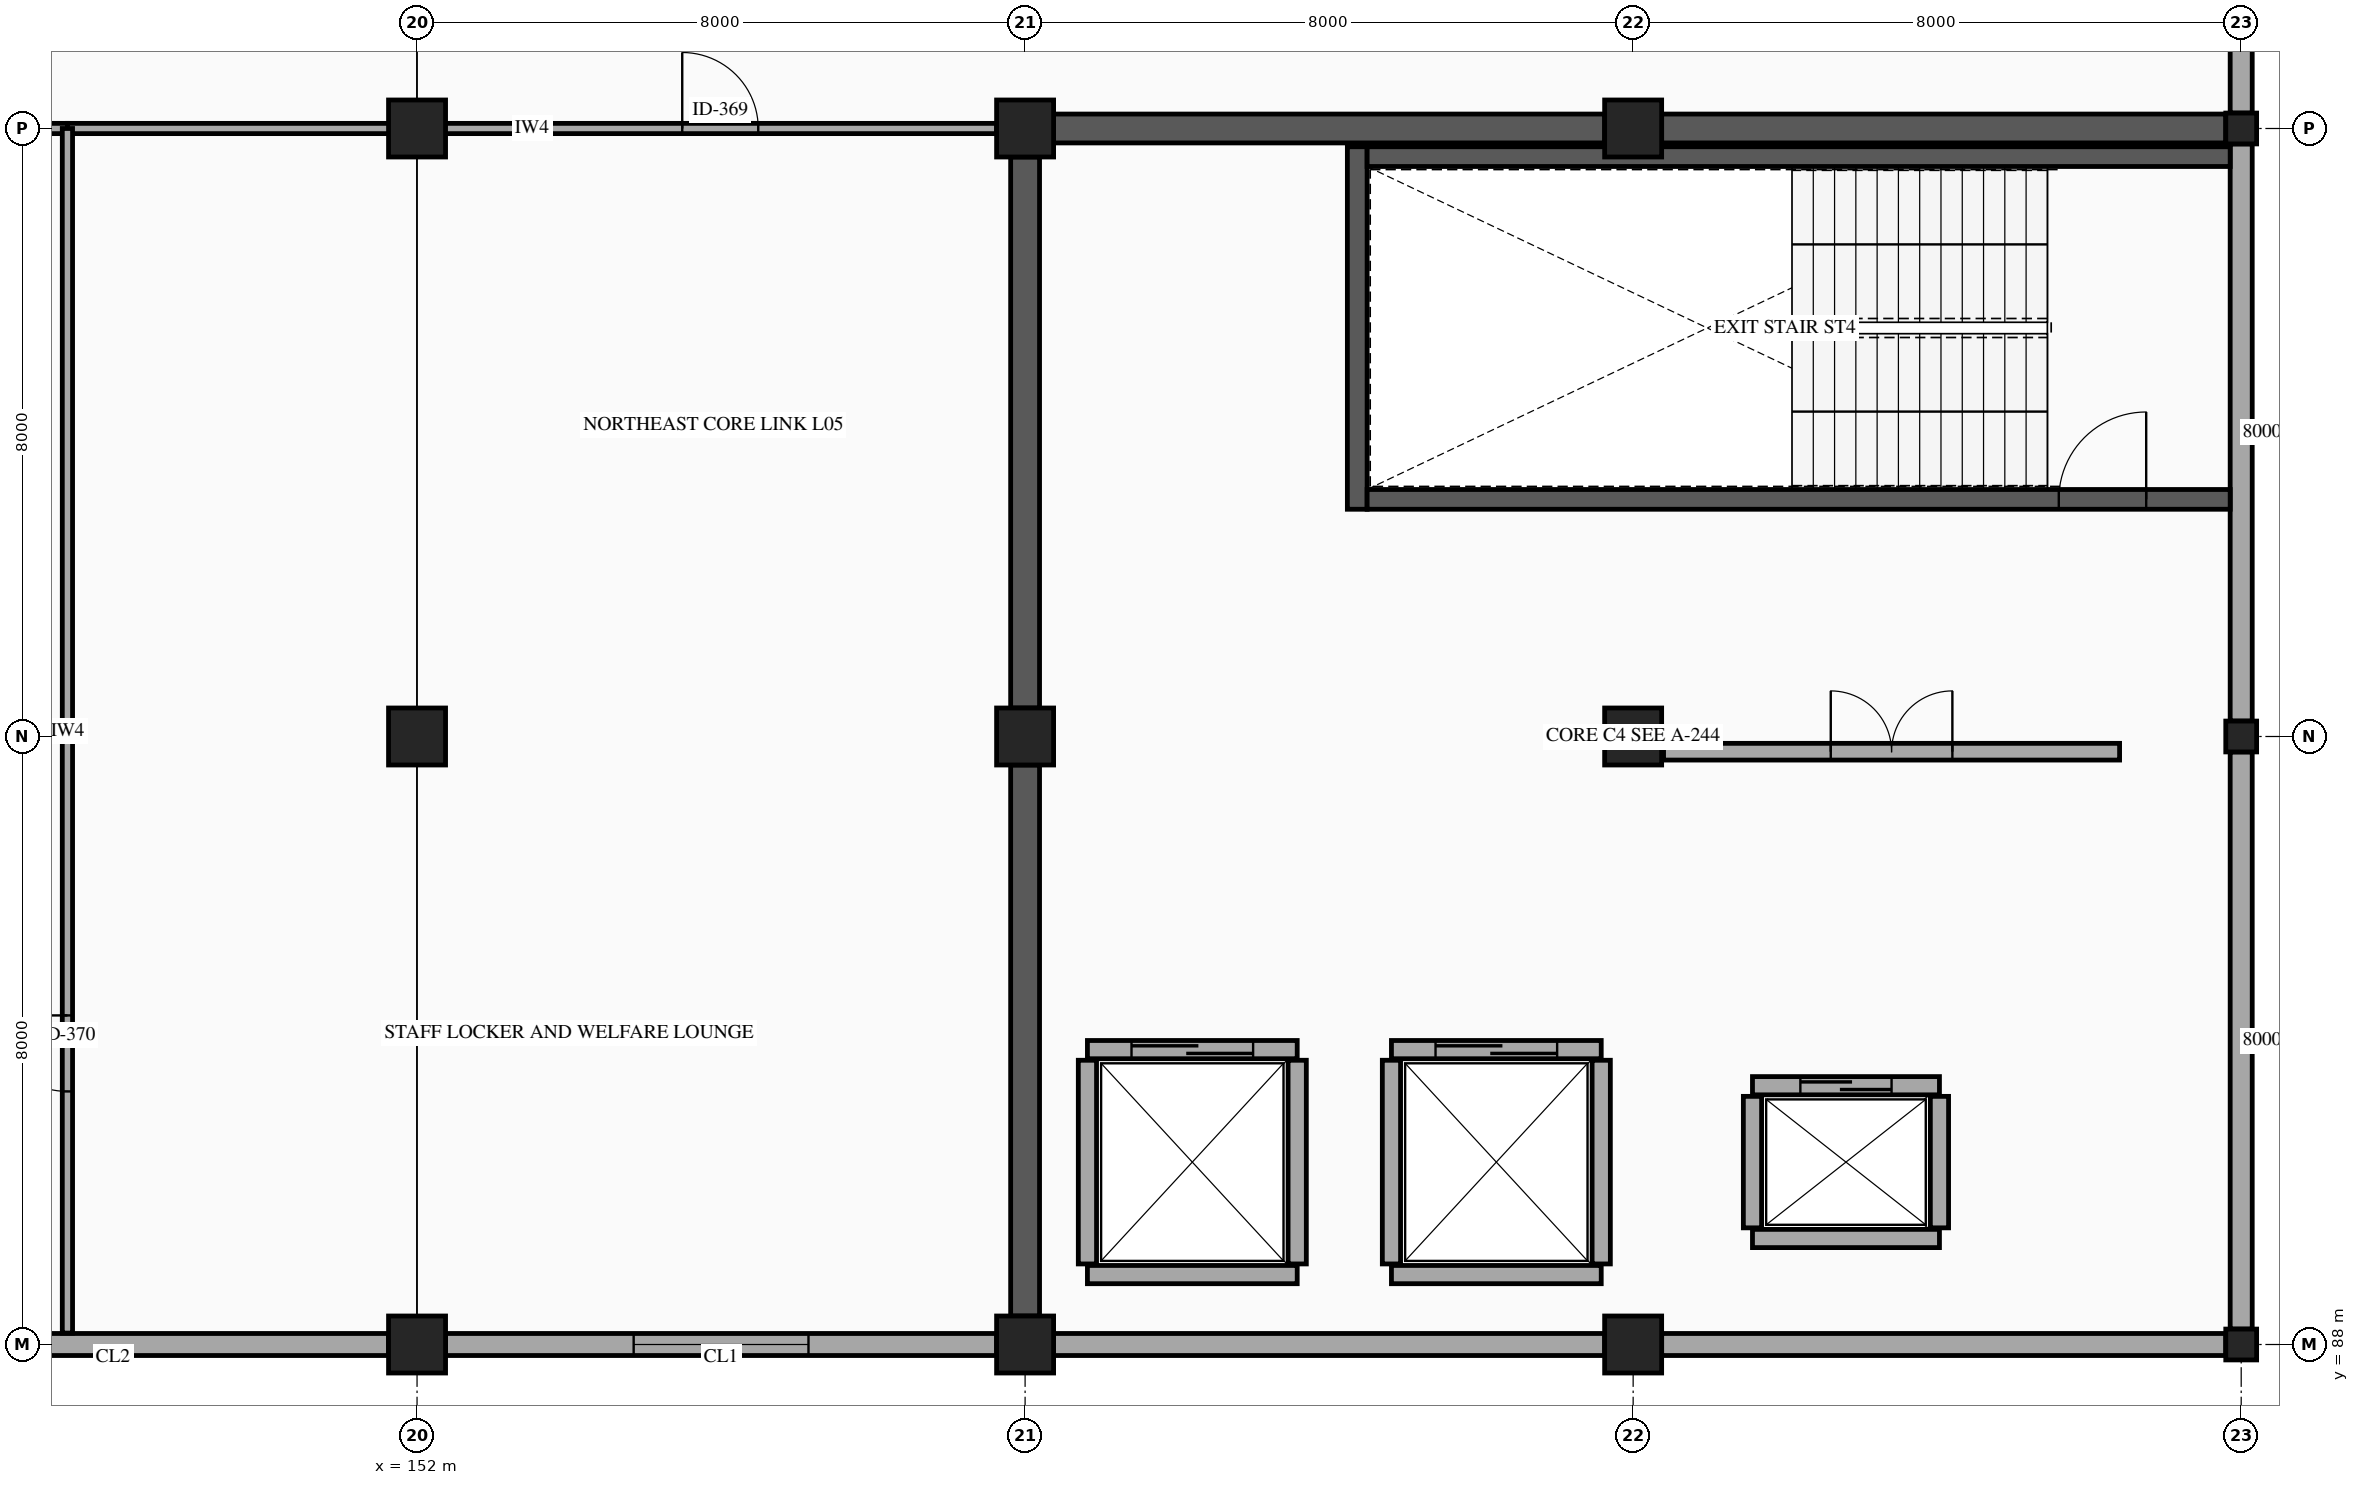
"""IFC4 building model, lengths in metres.
Left out: names, types, materials, properties, quantities, classifications, styles, units other than length and angle.
Written with IfcOpenShell. Run it as: python <this file> out.ifc"""

import sys

from ifc_helpers import new_model, si_unit, direction, frame, frame_2d, origin, origin_2d, place, context, subcontext, project, spatial, rectangle, hollow_rectangle, extrude, element, fill, save


model = new_model("IFC4")
c1 = context("Model", 3, precision=1e-05, world=origin(), true_north=direction((0.0, 1.0)))
c2 = subcontext(c1, "Body", "Model", "MODEL_VIEW")
j1 = project(units=[si_unit("LENGTHUNIT", "METRE"), si_unit("PLANEANGLEUNIT", "RADIAN")], contexts=[c1])
p1 = place(None, origin())
s1 = spatial("IfcSite", under=j1, at=p1, CompositionType="ELEMENT")
p2 = place(p1, origin())
s2 = spatial("IfcBuilding", under=s1, at=p2, CompositionType="ELEMENT")
p3 = place(p2, frame((0.0, 0.0, 23.9)))
s3 = spatial("IfcBuildingStorey", under=s2, at=p3, CompositionType="ELEMENT", Elevation=23.9)
for number, where, z_axis, x_axis in (
    (1, (152.0, 88.0, 0.0), (0.0, 0.0, 1.0), (1.0, 0.0, 0.0)),
    (2, (152.0, 96.0, 0.0), (0.0, 0.0, 1.0), (1.0, 0.0, 0.0)),
    (3, (152.0, 104.0, 0.0), (0.0, 0.0, 1.0), (1.0, 0.0, 0.0)),
    (4, (160.0, 88.0, 0.0), (0.0, 0.0, 1.0), (1.0, 0.0, 0.0)),
    (5, (160.0, 96.0, 0.0), (0.0, 0.0, 1.0), (1.0, 0.0, 0.0)),
    (6, (160.0, 104.0, 0.0), (0.0, 0.0, 1.0), (1.0, 0.0, 0.0)),
    (7, (168.0, 88.0, 0.0), (0.0, 0.0, 1.0), (1.0, 0.0, 0.0)),
    (8, (168.0, 96.0, 0.0), (0.0, 0.0, 1.0), (1.0, 0.0, 0.0)),
    (9, (168.0, 104.0, 0.0), (0.0, 0.0, 1.0), (1.0, 0.0, 0.0)),
):
    element("IfcColumn", number, at=place(p3, frame(where, z_axis=z_axis, x_axis=x_axis)), inside=s3, PredefinedType="COLUMN", context=c2, shape_type="SweptSolid", body=[
        extrude(rectangle(XDim=0.75, YDim=0.75, at=origin_2d()), origin(), (0.0, 0.0, 1.0), 4.5),
    ])
for number, where, z_axis, x_axis in (
    (10, (176.0, 88.0, 0.0), (0.0, 0.0, 1.0), (1.0, 0.0, 0.0)),
    (11, (176.0, 96.0, 0.0), (0.0, 0.0, 1.0), (1.0, 0.0, 0.0)),
    (12, (176.0, 104.0, 0.0), (0.0, 0.0, 1.0), (1.0, 0.0, 0.0)),
):
    element("IfcColumn", number, at=place(p3, frame(where, z_axis=z_axis, x_axis=x_axis)), inside=s3, PredefinedType="COLUMN", context=c2, shape_type="SweptSolid", body=[
        extrude(hollow_rectangle(XDim=0.406, YDim=0.406, WallThickness=0.015, InnerFilletRadius=0.015, OuterFilletRadius=0.029, at=origin_2d()), origin(), (0.0, 0.0, 1.0), 4.5),
    ])
for number, where, z_axis, x_axis in (
    (13, (176.0, 111.797, 0.0), (0.0, 0.0, 1.0), (0.0, -1.0, 0.0)),
    (14, (176.0, 103.797, 0.0), (0.0, 0.0, 1.0), (0.0, -1.0, 0.0)),
    (15, (176.0, 95.797, 0.0), (0.0, 0.0, 1.0), (0.0, -1.0, 0.0)),
):
    element("IfcWall", number, at=place(p3, frame(where, z_axis=z_axis, x_axis=x_axis)), inside=s3, PredefinedType="STANDARD", context=c2, shape_type="SweptSolid", body=[
        extrude(rectangle(XDim=7.594, YDim=0.29, at=frame_2d((3.797, 0.0))), origin(), (0.0, 0.0, 1.0), 3.48),
    ])
p4 = place(p3, frame((175.797, 88.0, 0.0), z_axis=(0.0, 0.0, 1.0), x_axis=(-1.0, 0.0, 0.0)))
e16 = element("IfcWall", 16, at=p4, inside=s3, PredefinedType="STANDARD", context=c2, shape_type="SweptSolid", body=[
    extrude(rectangle(XDim=7.422, YDim=0.29, at=frame_2d((3.711, 0.0))), origin(), (0.0, 0.0, 1.0), 3.48),
])
p5 = place(p3, frame((167.625, 88.0, 0.0), z_axis=(0.0, 0.0, 1.0), x_axis=(-1.0, 0.0, 0.0)))
e17 = element("IfcWall", 17, at=p5, inside=s3, PredefinedType="STANDARD", context=c2, shape_type="SweptSolid", body=[
    extrude(rectangle(XDim=7.25, YDim=0.29, at=frame_2d((3.625, 0.0))), origin(), (0.0, 0.0, 1.0), 3.48),
])
p6 = place(p3, frame((159.625, 88.0, 0.0), z_axis=(0.0, 0.0, 1.0), x_axis=(-1.0, 0.0, 0.0)))
e18 = element("IfcWall", 18, at=p6, inside=s3, PredefinedType="STANDARD", context=c2, shape_type="SweptSolid", body=[
    extrude(rectangle(XDim=7.25, YDim=0.29, at=frame_2d((3.625, 0.0))), origin(), (0.0, 0.0, 1.0), 3.48),
])
p7 = place(p6, frame((2.475, 0.0, 0.8)))
e19 = element("IfcOpeningElement", 19, at=p7, cuts=e18, PredefinedType="OPENING", context=c2, shape_type="SweptSolid", body=[
    extrude(rectangle(XDim=2.3, YDim=1.75, at=frame_2d((1.15, 0.875))), frame((0.0, 0.155, 0.0), z_axis=(0.0, -1.0, 0.0), x_axis=(1.0, 0.0, 0.0)), (0.0, 0.0, 1.0), 0.31),
])
p8 = place(p3, frame((151.625, 88.0, 0.0), z_axis=(0.0, 0.0, 1.0), x_axis=(-1.0, 0.0, 0.0)))
e20 = element("IfcWall", 20, at=p8, inside=s3, PredefinedType="STANDARD", context=c2, shape_type="SweptSolid", body=[
    extrude(rectangle(XDim=7.422, YDim=0.29, at=frame_2d((3.711, 0.0))), origin(), (0.0, 0.0, 1.0), 3.48),
])
p9 = place(p3, frame((164.37, 98.99, 0.0), z_axis=(0.0, 0.0, 1.0), x_axis=(0.0, 1.0, 0.0)))
e21 = element("IfcWall", 21, at=p9, inside=s3, PredefinedType="SHEAR", context=c2, shape_type="SweptSolid", body=[
    extrude(rectangle(XDim=4.77, YDim=0.26, at=frame_2d((2.385, 0.0))), origin(), (0.0, 0.0, 1.0), 4.28),
])
p10 = place(p3, frame((164.5, 99.12, 0.0), z_axis=(0.0, 0.0, 1.0), x_axis=(1.0, 0.0, 0.0)))
e22 = element("IfcWall", 22, at=p10, inside=s3, PredefinedType="SHEAR", context=c2, shape_type="SweptSolid", body=[
    extrude(rectangle(XDim=11.355, YDim=0.26, at=frame_2d((5.677, 0.0))), origin(), (0.0, 0.0, 1.0), 4.28),
])
p11 = place(p10, frame((9.1, 0.0, 0.0)))
e23 = element("IfcOpeningElement", 23, at=p11, cuts=e22, PredefinedType="OPENING", context=c2, shape_type="SweptSolid", body=[
    extrude(rectangle(XDim=1.15, YDim=2.15, at=frame_2d((0.575, 1.075))), frame((0.0, 0.14, 0.0), z_axis=(0.0, -1.0, 0.0), x_axis=(1.0, 0.0, 0.0)), (0.0, 0.0, 1.0), 0.28),
])
p12 = place(p3, frame((164.5, 103.63, 0.0), z_axis=(0.0, 0.0, 1.0), x_axis=(1.0, 0.0, 0.0)))
e24 = element("IfcWall", 24, at=p12, inside=s3, PredefinedType="SHEAR", context=c2, shape_type="SweptSolid", body=[
    extrude(rectangle(XDim=11.355, YDim=0.26, at=frame_2d((5.677, 0.0))), origin(), (0.0, 0.0, 1.0), 4.28),
])
p13 = place(p3, frame((160.375, 104.0, 0.0), z_axis=(0.0, 0.0, 1.0), x_axis=(1.0, 0.0, 0.0)))
e25 = element("IfcWall", 25, at=p13, inside=s3, PredefinedType="SHEAR", context=c2, shape_type="SweptSolid", body=[
    extrude(rectangle(XDim=7.25, YDim=0.38, at=frame_2d((3.625, 0.0))), origin(), (0.0, 0.0, 1.0), 4.28),
])
p14 = place(p3, frame((168.375, 104.0, 0.0), z_axis=(0.0, 0.0, 1.0), x_axis=(1.0, 0.0, 0.0)))
e26 = element("IfcWall", 26, at=p14, inside=s3, PredefinedType="SHEAR", context=c2, shape_type="SweptSolid", body=[
    extrude(rectangle(XDim=7.422, YDim=0.38, at=frame_2d((3.711, 0.0))), origin(), (0.0, 0.0, 1.0), 4.28),
])
for number, where, z_axis, x_axis in (
    (27, (160.0, 88.375, 0.0), (0.0, 0.0, 1.0), (0.0, 1.0, 0.0)),
    (28, (160.0, 96.375, 0.0), (0.0, 0.0, 1.0), (0.0, 1.0, 0.0)),
):
    element("IfcWall", number, at=place(p3, frame(where, z_axis=z_axis, x_axis=x_axis)), inside=s3, PredefinedType="SHEAR", context=c2, shape_type="SweptSolid", body=[
        extrude(rectangle(XDim=7.25, YDim=0.38, at=frame_2d((3.625, 0.0))), origin(), (0.0, 0.0, 1.0), 4.28),
    ])
p15 = place(p3, frame((169.57, 91.405, 0.0), z_axis=(0.0, 0.0, 1.0), x_axis=(1.0, 0.0, 0.0)))
e29 = element("IfcWall", 29, at=p15, inside=s3, PredefinedType="PARTITIONING", context=c2, shape_type="SweptSolid", body=[
    extrude(rectangle(XDim=2.46, YDim=0.24, at=frame_2d((1.23, 0.0))), origin(), (0.0, 0.0, 1.0), 4.28),
])
p16 = place(p15, frame((0.63, 0.0, 0.0)))
e30 = element("IfcOpeningElement", 30, at=p16, cuts=e29, PredefinedType="OPENING", context=c2, shape_type="SweptSolid", body=[
    extrude(rectangle(XDim=1.2, YDim=2.15, at=frame_2d((0.6, 1.075))), frame((0.0, 0.13, 0.0), z_axis=(0.0, -1.0, 0.0), x_axis=(1.0, 0.0, 0.0)), (0.0, 0.0, 1.0), 0.26),
])
p17 = place(p3, frame((169.57, 89.395, 0.0), z_axis=(0.0, 0.0, 1.0), x_axis=(1.0, 0.0, 0.0)))
e31 = element("IfcWall", 31, at=p17, inside=s3, PredefinedType="PARTITIONING", context=c2, shape_type="SweptSolid", body=[
    extrude(rectangle(XDim=2.46, YDim=0.24, at=frame_2d((1.23, 0.0))), origin(), (0.0, 0.0, 1.0), 4.28),
])
for number, where, z_axis, x_axis in (
    (32, (169.57, 89.535, 0.0), (0.0, 0.0, 1.0), (0.0, 1.0, 0.0)),
    (33, (172.03, 89.535, 0.0), (0.0, 0.0, 1.0), (0.0, 1.0, 0.0)),
):
    element("IfcWall", number, at=place(p3, frame(where, z_axis=z_axis, x_axis=x_axis)), inside=s3, PredefinedType="PARTITIONING", context=c2, shape_type="SweptSolid", body=[
        extrude(rectangle(XDim=1.73, YDim=0.24, at=frame_2d((0.865, 0.0))), origin(), (0.0, 0.0, 1.0), 4.28),
    ])
p18 = place(p3, frame((164.82, 91.88, 0.0), z_axis=(0.0, 0.0, 1.0), x_axis=(1.0, 0.0, 0.0)))
e34 = element("IfcWall", 34, at=p18, inside=s3, PredefinedType="PARTITIONING", context=c2, shape_type="SweptSolid", body=[
    extrude(rectangle(XDim=2.76, YDim=0.24, at=frame_2d((1.38, 0.0))), origin(), (0.0, 0.0, 1.0), 4.28),
])
p19 = place(p18, frame((0.58, 0.0, 0.0)))
e35 = element("IfcOpeningElement", 35, at=p19, cuts=e34, PredefinedType="OPENING", context=c2, shape_type="SweptSolid", body=[
    extrude(rectangle(XDim=1.6, YDim=2.3, at=frame_2d((0.8, 1.15))), frame((0.0, 0.13, 0.0), z_axis=(0.0, -1.0, 0.0), x_axis=(1.0, 0.0, 0.0)), (0.0, 0.0, 1.0), 0.26),
])
p20 = place(p3, frame((164.82, 88.92, 0.0), z_axis=(0.0, 0.0, 1.0), x_axis=(1.0, 0.0, 0.0)))
e36 = element("IfcWall", 36, at=p20, inside=s3, PredefinedType="PARTITIONING", context=c2, shape_type="SweptSolid", body=[
    extrude(rectangle(XDim=2.76, YDim=0.24, at=frame_2d((1.38, 0.0))), origin(), (0.0, 0.0, 1.0), 4.28),
])
for number, where, z_axis, x_axis in (
    (37, (164.82, 89.06, 0.0), (0.0, 0.0, 1.0), (0.0, 1.0, 0.0)),
    (38, (167.58, 89.06, 0.0), (0.0, 0.0, 1.0), (0.0, 1.0, 0.0)),
):
    element("IfcWall", number, at=place(p3, frame(where, z_axis=z_axis, x_axis=x_axis)), inside=s3, PredefinedType="PARTITIONING", context=c2, shape_type="SweptSolid", body=[
        extrude(rectangle(XDim=2.68, YDim=0.24, at=frame_2d((1.34, 0.0))), origin(), (0.0, 0.0, 1.0), 4.28),
    ])
p21 = place(p3, frame((160.82, 91.88, 0.0), z_axis=(0.0, 0.0, 1.0), x_axis=(1.0, 0.0, 0.0)))
e39 = element("IfcWall", 39, at=p21, inside=s3, PredefinedType="PARTITIONING", context=c2, shape_type="SweptSolid", body=[
    extrude(rectangle(XDim=2.76, YDim=0.24, at=frame_2d((1.38, 0.0))), origin(), (0.0, 0.0, 1.0), 4.28),
])
p22 = place(p21, frame((0.58, 0.0, 0.0)))
e40 = element("IfcOpeningElement", 40, at=p22, cuts=e39, PredefinedType="OPENING", context=c2, shape_type="SweptSolid", body=[
    extrude(rectangle(XDim=1.6, YDim=2.3, at=frame_2d((0.8, 1.15))), frame((0.0, 0.13, 0.0), z_axis=(0.0, -1.0, 0.0), x_axis=(1.0, 0.0, 0.0)), (0.0, 0.0, 1.0), 0.26),
])
p23 = place(p3, frame((160.82, 88.92, 0.0), z_axis=(0.0, 0.0, 1.0), x_axis=(1.0, 0.0, 0.0)))
e41 = element("IfcWall", 41, at=p23, inside=s3, PredefinedType="PARTITIONING", context=c2, shape_type="SweptSolid", body=[
    extrude(rectangle(XDim=2.76, YDim=0.24, at=frame_2d((1.38, 0.0))), origin(), (0.0, 0.0, 1.0), 4.28),
])
for number, where, z_axis, x_axis in (
    (42, (160.82, 89.06, 0.0), (0.0, 0.0, 1.0), (0.0, 1.0, 0.0)),
    (43, (163.58, 89.06, 0.0), (0.0, 0.0, 1.0), (0.0, 1.0, 0.0)),
):
    element("IfcWall", number, at=place(p3, frame(where, z_axis=z_axis, x_axis=x_axis)), inside=s3, PredefinedType="PARTITIONING", context=c2, shape_type="SweptSolid", body=[
        extrude(rectangle(XDim=2.68, YDim=0.24, at=frame_2d((1.34, 0.0))), origin(), (0.0, 0.0, 1.0), 4.28),
    ])
p24 = place(p3, frame((168.4, 95.8, 0.0), z_axis=(0.0, 0.0, 1.0), x_axis=(1.0, 0.0, 0.0)))
e44 = element("IfcWall", 44, at=p24, inside=s3, PredefinedType="PARTITIONING", context=c2, shape_type="SweptSolid", body=[
    extrude(rectangle(XDim=6.0, YDim=0.22, at=frame_2d((3.0, 0.0))), origin(), (0.0, 0.0, 1.0), 3.48),
])
p25 = place(p24, frame((2.2, 0.0, 0.0)))
e45 = element("IfcOpeningElement", 45, at=p25, cuts=e44, PredefinedType="OPENING", context=c2, shape_type="SweptSolid", body=[
    extrude(rectangle(XDim=1.6, YDim=2.15, at=frame_2d((0.8, 1.075))), frame((0.0, 0.12, 0.0), z_axis=(0.0, -1.0, 0.0), x_axis=(1.0, 0.0, 0.0)), (0.0, 0.0, 1.0), 0.24),
])
p26 = place(p3, frame((144.375, 104.0, 0.0), z_axis=(0.0, 0.0, 1.0), x_axis=(1.0, 0.0, 0.0)))
e46 = element("IfcWall", 46, at=p26, inside=s3, PredefinedType="PARTITIONING", context=c2, shape_type="SweptSolid", body=[
    extrude(rectangle(XDim=3.025, YDim=0.135, at=frame_2d((1.512, 0.0))), origin(), (0.0, 0.0, 1.0), 3.48),
])
p27 = place(p3, frame((147.4, 104.0, 0.0), z_axis=(0.0, 0.0, 1.0), x_axis=(1.0, 0.0, 0.0)))
e47 = element("IfcWall", 47, at=p27, inside=s3, PredefinedType="PARTITIONING", context=c2, shape_type="SweptSolid", body=[
    extrude(rectangle(XDim=12.225, YDim=0.135, at=frame_2d((6.113, 0.0))), origin(), (0.0, 0.0, 1.0), 3.48),
])
p28 = place(p27, frame((8.089, 0.0, 0.0)))
e48 = element("IfcOpeningElement", 48, at=p28, cuts=e47, PredefinedType="OPENING", context=c2, shape_type="SweptSolid", body=[
    extrude(rectangle(XDim=1.0, YDim=2.15, at=frame_2d((0.5, 1.075))), frame((0.0, 0.077, 0.0), z_axis=(0.0, -1.0, 0.0), x_axis=(1.0, 0.0, 0.0)), (0.0, 0.0, 1.0), 0.155),
])
p29 = place(p3, frame((147.4, 88.15, 0.0), z_axis=(0.0, 0.0, 1.0), x_axis=(0.0, 1.0, 0.0)))
e49 = element("IfcWall", 49, at=p29, inside=s3, PredefinedType="PARTITIONING", context=c2, shape_type="SweptSolid", body=[
    extrude(rectangle(XDim=15.85, YDim=0.135, at=frame_2d((7.925, 0.0))), origin(), (0.0, 0.0, 1.0), 3.48),
])
p30 = place(p29, frame((3.18, 0.0, 0.0)))
e50 = element("IfcOpeningElement", 50, at=p30, cuts=e49, PredefinedType="OPENING", context=c2, shape_type="SweptSolid", body=[
    extrude(rectangle(XDim=1.0, YDim=2.15, at=frame_2d((0.5, 1.075))), frame((0.0, 0.077, 0.0), z_axis=(0.0, -1.0, 0.0), x_axis=(1.0, 0.0, 0.0)), (0.0, 0.0, 1.0), 0.155),
])
p31 = place(p7, origin())
e51 = element("IfcWindow", 51, at=p31, inside=s3, PartitioningType="DOUBLE_PANEL_VERTICAL", PredefinedType="WINDOW", context=c2, shape_type="SweptSolid", body=[
    extrude(rectangle(XDim=2.3, YDim=1.75, at=frame_2d((1.15, 0.875))), frame((0.0, 0.03, 0.0), z_axis=(0.0, -1.0, 0.0), x_axis=(1.0, 0.0, 0.0)), (0.0, 0.0, 1.0), 0.06),
])
fill(e19, e51)
p32 = place(p11, origin())
e52 = element("IfcDoor", 52, at=p32, inside=s3, OperationType="SINGLE_SWING_RIGHT", PredefinedType="DOOR", context=c2, shape_type="SweptSolid", body=[
    extrude(rectangle(XDim=1.15, YDim=2.15, at=frame_2d((0.575, 1.075))), frame((0.0, 0.025, 0.0), z_axis=(0.0, -1.0, 0.0), x_axis=(1.0, 0.0, 0.0)), (0.0, 0.0, 1.0), 0.05),
])
fill(e23, e52)
p33 = place(p16, origin())
e53 = element("IfcDoor", 53, at=p33, inside=s3, OperationType="SLIDING_TO_LEFT", PredefinedType="DOOR", context=c2, shape_type="SweptSolid", body=[
    extrude(rectangle(XDim=1.2, YDim=2.15, at=frame_2d((0.6, 1.075))), frame((0.0, 0.025, 0.0), z_axis=(0.0, -1.0, 0.0), x_axis=(1.0, 0.0, 0.0)), (0.0, 0.0, 1.0), 0.05),
])
fill(e30, e53)
p34 = place(p19, origin())
e54 = element("IfcDoor", 54, at=p34, inside=s3, OperationType="SLIDING_TO_LEFT", PredefinedType="DOOR", context=c2, shape_type="SweptSolid", body=[
    extrude(rectangle(XDim=1.6, YDim=2.3, at=frame_2d((0.8, 1.15))), frame((0.0, 0.025, 0.0), z_axis=(0.0, -1.0, 0.0), x_axis=(1.0, 0.0, 0.0)), (0.0, 0.0, 1.0), 0.05),
])
fill(e35, e54)
p35 = place(p22, origin())
e55 = element("IfcDoor", 55, at=p35, inside=s3, OperationType="SLIDING_TO_LEFT", PredefinedType="DOOR", context=c2, shape_type="SweptSolid", body=[
    extrude(rectangle(XDim=1.6, YDim=2.3, at=frame_2d((0.8, 1.15))), frame((0.0, 0.025, 0.0), z_axis=(0.0, -1.0, 0.0), x_axis=(1.0, 0.0, 0.0)), (0.0, 0.0, 1.0), 0.05),
])
fill(e40, e55)
p36 = place(p25, origin())
e56 = element("IfcDoor", 56, at=p36, inside=s3, OperationType="DOUBLE_DOOR_SINGLE_SWING", PredefinedType="DOOR", context=c2, shape_type="SweptSolid", body=[
    extrude(rectangle(XDim=1.6, YDim=2.15, at=frame_2d((0.8, 1.075))), frame((0.0, 0.025, 0.0), z_axis=(0.0, -1.0, 0.0), x_axis=(1.0, 0.0, 0.0)), (0.0, 0.0, 1.0), 0.05),
])
fill(e45, e56)
p37 = place(p28, origin())
e57 = element("IfcDoor", 57, at=p37, inside=s3, OperationType="SINGLE_SWING_LEFT", PredefinedType="DOOR", context=c2, shape_type="SweptSolid", body=[
    extrude(rectangle(XDim=1.0, YDim=2.15, at=frame_2d((0.5, 1.075))), frame((0.0, 0.025, 0.0), z_axis=(0.0, -1.0, 0.0), x_axis=(1.0, 0.0, 0.0)), (0.0, 0.0, 1.0), 0.05),
])
fill(e48, e57)
p38 = place(p30, origin())
e58 = element("IfcDoor", 58, at=p38, inside=s3, OperationType="SINGLE_SWING_RIGHT", PredefinedType="DOOR", context=c2, shape_type="SweptSolid", body=[
    extrude(rectangle(XDim=1.0, YDim=2.15, at=frame_2d((0.5, 1.075))), frame((0.0, 0.025, 0.0), z_axis=(0.0, -1.0, 0.0), x_axis=(1.0, 0.0, 0.0)), (0.0, 0.0, 1.0), 0.05),
])
fill(e50, e58)
save(model, sys.argv[1])
